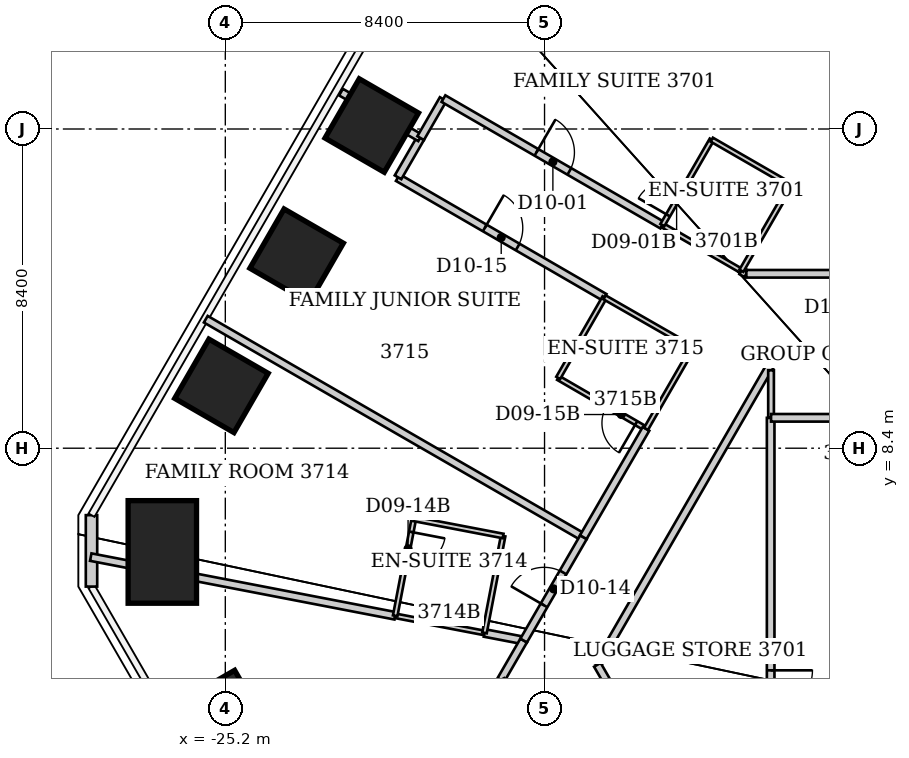
"""IFC4 building model, lengths in metres.
Left out: names, types, materials, properties, quantities, classifications, styles, units other than length and angle.
Written with IfcOpenShell. Run it as: python <this file> out.ifc"""

import sys

from ifc_helpers import new_model, si_unit, direction, frame, frame_2d, origin, origin_2d, place, context, subcontext, project, spatial, rectangle, extrude, element, fill, save


model = new_model("IFC4")
c1 = context("Model", 3, precision=1e-05, world=origin(), true_north=direction((0.0, 1.0)))
c2 = subcontext(c1, "Body", "Model", "MODEL_VIEW")
j1 = project(units=[si_unit("LENGTHUNIT", "METRE"), si_unit("PLANEANGLEUNIT", "RADIAN")], contexts=[c1])
p1 = place(None, origin())
s1 = spatial("IfcSite", under=j1, at=p1, CompositionType="ELEMENT")
p2 = place(p1, origin())
s2 = spatial("IfcBuilding", under=s1, at=p2, CompositionType="ELEMENT")
p3 = place(p2, frame((0.0, 0.0, 150.0)))
s3 = spatial("IfcBuildingStorey", under=s2, at=p3, CompositionType="ELEMENT", Elevation=150.0)
p4 = place(p3, frame((-25.284, 1.325, -0.07), z_axis=(0.05624416487, -0.002960219204, 0.998412655679), x_axis=(-0.864437776769, -0.500518005639, 0.047212880923)))
e1 = element("IfcColumn", 1, at=p4, inside=s3, PredefinedType="COLUMN", context=c2, shape_type="SweptSolid", body=[
    extrude(rectangle(XDim=1.8, YDim=1.8, at=origin_2d()), origin(), (0.0, 0.0, 1.0), 3.876),
])
p5 = place(p3, frame((-26.857, 5.67, -0.071), z_axis=(0.060174697358, -0.012714737308, 0.998106878672), x_axis=(-0.998187848607, -0.000609086615, 0.060171819876)))
e2 = element("IfcColumn", 2, at=p5, inside=s3, PredefinedType="COLUMN", context=c2, shape_type="SweptSolid", body=[
    extrude(rectangle(XDim=1.8, YDim=2.7, at=origin_2d()), origin(), (0.0, 0.0, 1.0), 3.879),
])
p6 = place(p3, frame((-25.302, 10.041, -0.061), z_axis=(0.055421674634, -0.021966677417, 0.998221369769), x_axis=(-0.864472305627, 0.499208205688, 0.058981354491)))
e3 = element("IfcColumn", 3, at=p6, inside=s3, PredefinedType="COLUMN", context=c2, shape_type="SweptSolid", body=[
    extrude(rectangle(XDim=1.8, YDim=1.8, at=origin_2d()), origin(), (0.0, 0.0, 1.0), 3.868),
])
p7 = place(p3, frame((-23.324, 13.466, -0.053), z_axis=(0.0511051556, -0.029474013007, 0.998258255978), x_axis=(-0.864748173328, 0.498728525707, 0.058995375849)))
e4 = element("IfcColumn", 4, at=p7, inside=s3, PredefinedType="COLUMN", context=c2, shape_type="SweptSolid", body=[
    extrude(rectangle(XDim=1.8, YDim=1.8, at=origin_2d()), origin(), (0.0, 0.0, 1.0), 3.86),
])
p8 = place(p3, frame((-21.346, 16.891, -0.061), z_axis=(0.046773827899, -0.036989828811, 0.998220397301), x_axis=(-0.864919891938, 0.498430416416, 0.058997461992)))
e5 = element("IfcColumn", 5, at=p8, inside=s3, PredefinedType="COLUMN", context=c2, shape_type="SweptSolid", body=[
    extrude(rectangle(XDim=1.8, YDim=1.8, at=origin_2d()), origin(), (0.0, 0.0, 1.0), 3.868),
])
p9 = place(p3, frame((-18.339, 20.424, -0.071), z_axis=(0.041102575275, -0.045760447511, 0.998106487179), x_axis=(-0.498560434841, 0.864763607509, 0.060178035354)))
e6 = element("IfcColumn", 6, at=p9, inside=s3, PredefinedType="COLUMN", context=c2, shape_type="SweptSolid", body=[
    extrude(rectangle(XDim=1.8, YDim=2.7, at=origin_2d()), origin(), (0.0, 0.0, 1.0), 3.879),
])
p10 = place(p3, frame((-28.721, 4.759, 0.0), z_axis=(0.0, 0.0, 1.0), x_axis=(0.0, 1.0, 0.0)))
e7 = element("IfcWall", 7, at=p10, inside=s3, PredefinedType="SOLIDWALL", context=c2, shape_type="SweptSolid", body=[
    extrude(rectangle(XDim=1.88, YDim=0.3, at=frame_2d((0.94, 0.0))), origin(), (0.0, 0.0, 1.0), 3.64),
])
p11 = place(p3, frame((-28.74, 5.534, 0.0), z_axis=(0.0, 0.0, 1.0), x_axis=(0.981916471091, -0.189314668743, 0.0)))
e8 = element("IfcWall", 8, at=p11, inside=s3, PredefinedType="PARTITIONING", context=c2, shape_type="SweptSolid", body=[
    extrude(rectangle(XDim=8.158, YDim=0.2, at=frame_2d((4.079, 0.0))), origin(), (0.0, 0.0, 1.0), 3.64),
])
p12 = place(p3, frame((-25.714, 11.795, 0.0), z_axis=(0.0, 0.0, 1.0), x_axis=(0.866045467449, -0.499965247104, 0.0)))
e9 = element("IfcWall", 9, at=p12, inside=s3, PredefinedType="PARTITIONING", context=c2, shape_type="SweptSolid", body=[
    extrude(rectangle(XDim=11.461, YDim=0.2, at=frame_2d((5.73, 0.0))), origin(), (0.0, 0.0, 1.0), 3.64),
])
p13 = place(p3, frame((-20.73, 3.99, 0.0), z_axis=(0.0, 0.0, 1.0), x_axis=(0.982021000234, -0.188771701001, 0.0)))
e10 = element("IfcWall", 10, at=p13, inside=s3, PredefinedType="PARTITIONING", context=c2, shape_type="SweptSolid", body=[
    extrude(rectangle(XDim=2.393, YDim=0.12, at=frame_2d((1.196, 0.0))), origin(), (0.0, 0.0, 1.0), 3.64),
])
p14 = place(p3, frame((-20.66, 15.52, 0.0), z_axis=(0.0, 0.0, 1.0), x_axis=(0.86537753305, -0.501120469839, 0.0)))
e11 = element("IfcWall", 11, at=p14, inside=s3, PredefinedType="PARTITIONING", context=c2, shape_type="SweptSolid", body=[
    extrude(rectangle(XDim=6.286, YDim=0.2, at=frame_2d((3.143, 0.0))), origin(), (0.0, 0.0, 1.0), 3.64),
])
p15 = place(p14, frame((2.643, 0.0, 0.0)))
e12 = element("IfcOpeningElement", 12, at=p15, cuts=e11, PredefinedType="OPENING", context=c2, shape_type="SweptSolid", body=[
    extrude(rectangle(XDim=1.0, YDim=2.13, at=frame_2d((0.5, 1.065))), frame((0.0, 0.1, 0.0), z_axis=(0.0, -1.0, 0.0), x_axis=(1.0, 0.0, 0.0)), (0.0, 0.0, 1.0), 0.2),
])
p16 = place(p3, frame((-20.655, 15.529, 0.0), z_axis=(0.0, 0.0, 1.0), x_axis=(0.49964553876, 0.86622995538, 0.0)))
e13 = element("IfcWall", 13, at=p16, inside=s3, PredefinedType="PARTITIONING", context=c2, shape_type="SweptSolid", body=[
    extrude(rectangle(XDim=1.191, YDim=0.2, at=frame_2d((0.595, 0.0))), origin(), (0.0, 0.0, 1.0), 3.64),
])
p17 = place(p3, frame((-20.24, 6.54, 0.0), z_axis=(0.0, 0.0, 1.0), x_axis=(-0.188697442844, -0.982035271802, 0.0)))
e14 = element("IfcWall", 14, at=p17, inside=s3, PredefinedType="PARTITIONING", context=c2, shape_type="SweptSolid", body=[
    extrude(rectangle(XDim=2.597, YDim=0.12, at=frame_2d((1.298, 0.0))), origin(), (0.0, 0.0, 1.0), 3.64),
])
p18 = place(p17, frame((0.35, 0.0, 0.0)))
e15 = element("IfcOpeningElement", 15, at=p18, cuts=e14, PredefinedType="OPENING", context=c2, shape_type="SweptSolid", body=[
    extrude(rectangle(XDim=0.9, YDim=2.03, at=frame_2d((0.45, 1.015))), frame((0.0, 0.06, 0.0), z_axis=(0.0, -1.0, 0.0), x_axis=(1.0, 0.0, 0.0)), (0.0, 0.0, 1.0), 0.12),
])
p19 = place(p3, frame((-20.073, 16.567, 0.0), z_axis=(0.0, 0.0, 1.0), x_axis=(-0.866023315909, 0.500003616288, 0.0)))
e16 = element("IfcWall", 16, at=p19, inside=s3, PredefinedType="PARTITIONING", context=c2, shape_type="SweptSolid", body=[
    extrude(rectangle(XDim=2.405, YDim=0.2, at=frame_2d((1.203, 0.0))), origin(), (0.0, 0.0, 1.0), 3.64),
])
p20 = place(p3, frame((-20.06, 16.56, 0.0), z_axis=(0.0, 0.0, 1.0), x_axis=(0.499704629046, 0.866195869137, 0.0)))
e17 = element("IfcWall", 17, at=p20, inside=s3, PredefinedType="PARTITIONING", context=c2, shape_type="SweptSolid", body=[
    extrude(rectangle(XDim=1.186, YDim=0.2, at=frame_2d((0.593, 0.0))), origin(), (0.0, 0.0, 1.0), 3.64),
])
p21 = place(p3, frame((-19.46, 17.6, 0.0), z_axis=(0.0, 0.0, 1.0), x_axis=(0.865623013862, -0.50069631302, 0.0)))
e18 = element("IfcWall", 18, at=p21, inside=s3, PredefinedType="PARTITIONING", context=c2, shape_type="SweptSolid", body=[
    extrude(rectangle(XDim=6.653, YDim=0.2, at=frame_2d((3.327, 0.0))), origin(), (0.0, 0.0, 1.0), 3.64),
])
p22 = place(p21, frame((2.827, 0.0, 0.0)))
e19 = element("IfcOpeningElement", 19, at=p22, cuts=e18, PredefinedType="OPENING", context=c2, shape_type="SweptSolid", body=[
    extrude(rectangle(XDim=1.0, YDim=2.13, at=frame_2d((0.5, 1.065))), frame((0.0, 0.1, 0.0), z_axis=(0.0, -1.0, 0.0), x_axis=(1.0, 0.0, 0.0)), (0.0, 0.0, 1.0), 0.2),
])
p23 = place(p3, frame((-18.38, 3.538, 0.0), z_axis=(0.0, 0.0, 1.0), x_axis=(0.981957872109, -0.189099808045, 0.0)))
e20 = element("IfcWall", 20, at=p23, inside=s3, PredefinedType="PARTITIONING", context=c2, shape_type="SweptSolid", body=[
    extrude(rectangle(XDim=1.004, YDim=0.2, at=frame_2d((0.502, 0.0))), origin(), (0.0, 0.0, 1.0), 3.64),
])
p24 = place(p3, frame((-18.38, 3.54, 0.0), z_axis=(0.0, 0.0, 1.0), x_axis=(0.188697442844, 0.982035271802, 0.0)))
e21 = element("IfcWall", 21, at=p24, inside=s3, PredefinedType="PARTITIONING", context=c2, shape_type="SweptSolid", body=[
    extrude(rectangle(XDim=2.597, YDim=0.12, at=frame_2d((1.298, 0.0))), origin(), (0.0, 0.0, 1.0), 3.64),
])
p25 = place(p3, frame((-17.95, 2.3, 0.0), z_axis=(0.0, 0.0, 1.0), x_axis=(0.500795801589, 0.865565459749, 0.0)))
e22 = element("IfcWall", 22, at=p25, inside=s3, PredefinedType="PARTITIONING", context=c2, shape_type="SweptSolid", body=[
    extrude(rectangle(XDim=1.201, YDim=0.2, at=frame_2d((0.6, 0.0))), origin(), (0.0, 0.0, 1.0), 3.64),
])
p26 = place(p3, frame((-17.95, 2.3, 0.0), z_axis=(0.0, 0.0, 1.0), x_axis=(0.500336423072, -0.865831082687, 0.0)))
e23 = element("IfcWall", 23, at=p26, inside=s3, PredefinedType="PARTITIONING", context=c2, shape_type="SweptSolid", body=[
    extrude(rectangle(XDim=5.117, YDim=0.2, at=frame_2d((2.558, 0.0))), origin(), (0.0, 0.0, 1.0), 3.64),
])
p27 = place(p3, frame((-17.89, 6.09, 0.0), z_axis=(0.0, 0.0, 1.0), x_axis=(-0.982160404505, 0.18804504732, 0.0)))
e24 = element("IfcWall", 24, at=p27, inside=s3, PredefinedType="PARTITIONING", context=c2, shape_type="SweptSolid", body=[
    extrude(rectangle(XDim=2.393, YDim=0.12, at=frame_2d((1.196, 0.0))), origin(), (0.0, 0.0, 1.0), 3.64),
])
p28 = place(p3, frame((-17.349, 3.339, 0.0), z_axis=(0.0, 0.0, 1.0), x_axis=(0.500803353914, 0.865561090108, 0.0)))
e25 = element("IfcWall", 25, at=p28, inside=s3, PredefinedType="PARTITIONING", context=c2, shape_type="SweptSolid", body=[
    extrude(rectangle(XDim=3.14, YDim=0.2, at=frame_2d((1.57, 0.0))), origin(), (0.0, 0.0, 1.0), 3.64),
])
p29 = place(p28, frame((1.07, 0.0, 0.0)))
e26 = element("IfcOpeningElement", 26, at=p29, cuts=e25, PredefinedType="OPENING", context=c2, shape_type="SweptSolid", body=[
    extrude(rectangle(XDim=1.0, YDim=2.13, at=frame_2d((0.5, 1.065))), frame((0.0, 0.1, 0.0), z_axis=(0.0, -1.0, 0.0), x_axis=(1.0, 0.0, 0.0)), (0.0, 0.0, 1.0), 0.2),
])
p30 = place(p3, frame((-16.44, 10.25, 0.0), z_axis=(0.0, 0.0, 1.0), x_axis=(0.864966903181, -0.501828911485, 0.0)))
e27 = element("IfcWall", 27, at=p30, inside=s3, PredefinedType="PARTITIONING", context=c2, shape_type="SweptSolid", body=[
    extrude(rectangle(XDim=2.67, YDim=0.12, at=frame_2d((1.335, 0.0))), origin(), (0.0, 0.0, 1.0), 3.64),
])
p31 = place(p30, frame((1.47, 0.0, 0.0)))
e28 = element("IfcOpeningElement", 28, at=p31, cuts=e27, PredefinedType="OPENING", context=c2, shape_type="SweptSolid", body=[
    extrude(rectangle(XDim=0.9, YDim=2.03, at=frame_2d((0.45, 1.015))), frame((0.0, 0.06, 0.0), z_axis=(0.0, -1.0, 0.0), x_axis=(1.0, 0.0, 0.0)), (0.0, 0.0, 1.0), 0.12),
])
p32 = place(p3, frame((-15.78, 6.06, 0.0), z_axis=(0.0, 0.0, 1.0), x_axis=(0.501088872721, 0.865395829453, 0.0)))
e29 = element("IfcWall", 29, at=p32, inside=s3, PredefinedType="PARTITIONING", context=c2, shape_type="SweptSolid", body=[
    extrude(rectangle(XDim=3.293, YDim=0.2, at=frame_2d((1.646, 0.0))), origin(), (0.0, 0.0, 1.0), 3.64),
])
p33 = place(p3, frame((-15.41, 2.7, 0.0), z_axis=(0.0, 0.0, 1.0), x_axis=(0.500237524763, 0.865888225361, 0.0)))
e30 = element("IfcWall", 30, at=p33, inside=s3, PredefinedType="PARTITIONING", context=c2, shape_type="SweptSolid", body=[
    extrude(rectangle(XDim=9.135, YDim=0.2, at=frame_2d((4.568, 0.0))), origin(), (0.0, 0.0, 1.0), 3.64),
])
p34 = place(p3, frame((-15.22, 12.37, 0.0), z_axis=(0.0, 0.0, 1.0), x_axis=(-0.498748634132, -0.866746675766, 0.0)))
e31 = element("IfcWall", 31, at=p34, inside=s3, PredefinedType="PARTITIONING", context=c2, shape_type="SweptSolid", body=[
    extrude(rectangle(XDim=2.446, YDim=0.12, at=frame_2d((1.223, 0.0))), origin(), (0.0, 0.0, 1.0), 3.64),
])
p35 = place(p3, frame((-15.22, 12.37, 0.0), z_axis=(0.0, 0.0, 1.0), x_axis=(0.867545659855, -0.497357545501, 0.0)))
e32 = element("IfcWall", 32, at=p35, inside=s3, PredefinedType="PARTITIONING", context=c2, shape_type="SweptSolid", body=[
    extrude(rectangle(XDim=2.674, YDim=0.12, at=frame_2d((1.337, 0.0))), origin(), (0.0, 0.0, 1.0), 3.64),
])
p36 = place(p3, frame((-14.13, 8.91, 0.0), z_axis=(0.0, 0.0, 1.0), x_axis=(0.500046071023, 0.865998803033, 0.0)))
e33 = element("IfcWall", 33, at=p36, inside=s3, PredefinedType="PARTITIONING", context=c2, shape_type="SweptSolid", body=[
    extrude(rectangle(XDim=2.46, YDim=0.12, at=frame_2d((1.23, 0.0))), origin(), (0.0, 0.0, 1.0), 3.64),
])
p37 = place(p3, frame((-13.701, 14.269, 0.0), z_axis=(0.0, 0.0, 1.0), x_axis=(0.865609526999, -0.500719628902, 0.0)))
e34 = element("IfcWall", 34, at=p37, inside=s3, PredefinedType="PARTITIONING", context=c2, shape_type="SweptSolid", body=[
    extrude(rectangle(XDim=2.401, YDim=0.12, at=frame_2d((1.201, 0.0))), origin(), (0.0, 0.0, 1.0), 3.64),
])
p38 = place(p3, frame((-12.4, 16.52, 0.0), z_axis=(0.0, 0.0, 1.0), x_axis=(-0.500291685314, -0.865856933682, 0.0)))
e35 = element("IfcWall", 35, at=p38, inside=s3, PredefinedType="PARTITIONING", context=c2, shape_type="SweptSolid", body=[
    extrude(rectangle(XDim=2.599, YDim=0.12, at=frame_2d((1.299, 0.0))), origin(), (0.0, 0.0, 1.0), 3.64),
])
p39 = place(p38, frame((1.399, 0.0, 0.0)))
e36 = element("IfcOpeningElement", 36, at=p39, cuts=e35, PredefinedType="OPENING", context=c2, shape_type="SweptSolid", body=[
    extrude(rectangle(XDim=0.9, YDim=2.03, at=frame_2d((0.45, 1.015))), frame((0.0, 0.06, 0.0), z_axis=(0.0, -1.0, 0.0), x_axis=(1.0, 0.0, 0.0)), (0.0, 0.0, 1.0), 0.12),
])
p40 = place(p3, frame((-11.622, 13.066, 0.0), z_axis=(0.0, 0.0, 1.0), x_axis=(0.865572302129, -0.500783975169, 0.0)))
e37 = element("IfcWall", 37, at=p40, inside=s3, PredefinedType="PARTITIONING", context=c2, shape_type="SweptSolid", body=[
    extrude(rectangle(XDim=0.153, YDim=0.2, at=frame_2d((0.076, 0.0))), origin(), (0.0, 0.0, 1.0), 3.64),
])
p41 = place(p3, frame((-11.62, 13.07, 0.0), z_axis=(0.0, 0.0, 1.0), x_axis=(0.500291685314, 0.865856933682, 0.0)))
e38 = element("IfcWall", 38, at=p41, inside=s3, PredefinedType="PARTITIONING", context=c2, shape_type="SweptSolid", body=[
    extrude(rectangle(XDim=2.599, YDim=0.12, at=frame_2d((1.299, 0.0))), origin(), (0.0, 0.0, 1.0), 3.64),
])
p42 = place(p3, frame((-10.948, -5.021, 0.0), z_axis=(0.0, 0.0, 1.0), x_axis=(-0.500384322182, 0.865803401538, 0.0)))
e39 = element("IfcWall", 39, at=p42, inside=s3, PredefinedType="PARTITIONING", context=c2, shape_type="SweptSolid", body=[
    extrude(rectangle(XDim=8.918, YDim=0.2, at=frame_2d((4.459, 0.0))), origin(), (0.0, 0.0, 1.0), 3.64),
])
p43 = place(p3, frame((-10.85, 9.2, 0.0), z_axis=(0.0, 0.0, 1.0), x_axis=(0.0, -1.0, 0.0)))
e40 = element("IfcWall", 40, at=p43, inside=s3, PredefinedType="PARTITIONING", context=c2, shape_type="SweptSolid", body=[
    extrude(rectangle(XDim=14.39, YDim=0.2, at=frame_2d((7.195, 0.0))), origin(), (0.0, 0.0, 1.0), 3.64),
])
p44 = place(p43, frame((6.645, 0.0, 0.0)))
e41 = element("IfcOpeningElement", 41, at=p44, cuts=e40, PredefinedType="OPENING", context=c2, shape_type="SweptSolid", body=[
    extrude(rectangle(XDim=1.1, YDim=2.2, at=frame_2d((0.55, 1.1))), frame((0.0, 0.1, 0.0), z_axis=(0.0, -1.0, 0.0), x_axis=(1.0, 0.0, 0.0)), (0.0, 0.0, 1.0), 0.2),
])
p45 = place(p3, frame((-10.84, 10.45, 0.0), z_axis=(0.0, 0.0, 1.0), x_axis=(0.0, -1.0, 0.0)))
e42 = element("IfcWall", 42, at=p45, inside=s3, PredefinedType="PARTITIONING", context=c2, shape_type="SweptSolid", body=[
    extrude(rectangle(XDim=1.25, YDim=0.15, at=frame_2d((0.625, 0.0))), origin(), (0.0, 0.0, 1.0), 3.64),
])
p46 = place(p3, frame((-10.84, 10.61, 0.0), z_axis=(0.0, 0.0, 1.0), x_axis=(0.501518373175, 0.865146994081, 0.0)))
e43 = element("IfcWall", 43, at=p46, inside=s3, PredefinedType="PARTITIONING", context=c2, shape_type="SweptSolid", body=[
    extrude(rectangle(XDim=0.439, YDim=0.2, at=frame_2d((0.22, 0.0))), origin(), (0.0, 0.0, 1.0), 3.64),
])
p47 = place(p3, frame((-10.62, 10.99, 0.0), z_axis=(0.0, 0.0, 1.0), x_axis=(1.0, 0.0, 0.0)))
e44 = element("IfcWall", 44, at=p47, inside=s3, PredefinedType="PARTITIONING", context=c2, shape_type="SweptSolid", body=[
    extrude(rectangle(XDim=4.35, YDim=0.2, at=frame_2d((2.175, 0.0))), origin(), (0.0, 0.0, 1.0), 3.64),
])
p48 = place(p3, frame((-10.32, 15.32, 0.0), z_axis=(0.0, 0.0, 1.0), x_axis=(-0.866177122335, 0.499737123639, 0.0)))
e45 = element("IfcWall", 45, at=p48, inside=s3, PredefinedType="PARTITIONING", context=c2, shape_type="SweptSolid", body=[
    extrude(rectangle(XDim=2.401, YDim=0.12, at=frame_2d((1.201, 0.0))), origin(), (0.0, 0.0, 1.0), 3.64),
])
p49 = place(p3, frame((-8.96, 12.99, 0.0), z_axis=(0.0, 0.0, 1.0), x_axis=(-1.0, 0.0, 0.0)))
e46 = element("IfcWall", 46, at=p49, inside=s3, PredefinedType="PARTITIONING", context=c2, shape_type="SweptSolid", body=[
    extrude(rectangle(XDim=2.53, YDim=0.2, at=frame_2d((1.265, 0.0))), origin(), (0.0, 0.0, 1.0), 3.64),
])
p50 = place(p3, frame((-6.27, 9.2, 0.0), z_axis=(0.0, 0.0, 1.0), x_axis=(-1.0, 0.0, 0.0)))
e47 = element("IfcWall", 47, at=p50, inside=s3, PredefinedType="PARTITIONING", context=c2, shape_type="SweptSolid", body=[
    extrude(rectangle(XDim=4.57, YDim=0.2, at=frame_2d((2.285, 0.0))), origin(), (0.0, 0.0, 1.0), 3.64),
])
p51 = place(p50, frame((1.735, 0.0, 0.0)))
e48 = element("IfcOpeningElement", 48, at=p51, cuts=e47, PredefinedType="OPENING", context=c2, shape_type="SweptSolid", body=[
    extrude(rectangle(XDim=1.1, YDim=2.2, at=frame_2d((0.55, 1.1))), frame((0.0, 0.1, 0.0), z_axis=(0.0, -1.0, 0.0), x_axis=(1.0, 0.0, 0.0)), (0.0, 0.0, 1.0), 0.2),
])
p52 = place(p22, origin())
e49 = element("IfcDoor", 49, at=p52, inside=s3, OperationType="SINGLE_SWING_LEFT", PredefinedType="DOOR", context=c2, shape_type="SweptSolid", body=[
    extrude(rectangle(XDim=1.0, YDim=2.13, at=frame_2d((0.5, 1.065))), frame((0.0, 0.025, 0.0), z_axis=(0.0, -1.0, 0.0), x_axis=(1.0, 0.0, 0.0)), (0.0, 0.0, 1.0), 0.05),
])
fill(e19, e49)
p53 = place(p39, origin())
e50 = element("IfcDoor", 50, at=p53, inside=s3, OperationType="SINGLE_SWING_RIGHT", PredefinedType="DOOR", context=c2, shape_type="SweptSolid", body=[
    extrude(rectangle(XDim=0.9, YDim=2.03, at=frame_2d((0.45, 1.015))), frame((0.0, 0.025, 0.0), z_axis=(0.0, -1.0, 0.0), x_axis=(1.0, 0.0, 0.0)), (0.0, 0.0, 1.0), 0.05),
])
fill(e36, e50)
p54 = place(p29, origin())
e51 = element("IfcDoor", 51, at=p54, inside=s3, OperationType="SINGLE_SWING_LEFT", PredefinedType="DOOR", context=c2, shape_type="SweptSolid", body=[
    extrude(rectangle(XDim=1.0, YDim=2.13, at=frame_2d((0.5, 1.065))), frame((0.0, 0.025, 0.0), z_axis=(0.0, -1.0, 0.0), x_axis=(1.0, 0.0, 0.0)), (0.0, 0.0, 1.0), 0.05),
])
fill(e26, e51)
p55 = place(p18, origin())
e52 = element("IfcDoor", 52, at=p55, inside=s3, OperationType="SINGLE_SWING_LEFT", PredefinedType="DOOR", context=c2, shape_type="SweptSolid", body=[
    extrude(rectangle(XDim=0.9, YDim=2.03, at=frame_2d((0.45, 1.015))), frame((0.0, 0.025, 0.0), z_axis=(0.0, -1.0, 0.0), x_axis=(1.0, 0.0, 0.0)), (0.0, 0.0, 1.0), 0.05),
])
fill(e15, e52)
p56 = place(p15, origin())
e53 = element("IfcDoor", 53, at=p56, inside=s3, OperationType="SINGLE_SWING_LEFT", PredefinedType="DOOR", context=c2, shape_type="SweptSolid", body=[
    extrude(rectangle(XDim=1.0, YDim=2.13, at=frame_2d((0.5, 1.065))), frame((0.0, 0.025, 0.0), z_axis=(0.0, -1.0, 0.0), x_axis=(1.0, 0.0, 0.0)), (0.0, 0.0, 1.0), 0.05),
])
fill(e12, e53)
p57 = place(p31, origin())
e54 = element("IfcDoor", 54, at=p57, inside=s3, OperationType="SINGLE_SWING_RIGHT", PredefinedType="DOOR", context=c2, shape_type="SweptSolid", body=[
    extrude(rectangle(XDim=0.9, YDim=2.03, at=frame_2d((0.45, 1.015))), frame((0.0, 0.025, 0.0), z_axis=(0.0, -1.0, 0.0), x_axis=(1.0, 0.0, 0.0)), (0.0, 0.0, 1.0), 0.05),
])
fill(e28, e54)
p58 = place(p44, origin())
e55 = element("IfcDoor", 55, at=p58, inside=s3, OperationType="SINGLE_SWING_LEFT", PredefinedType="DOOR", context=c2, shape_type="SweptSolid", body=[
    extrude(rectangle(XDim=1.1, YDim=2.2, at=frame_2d((0.55, 1.1))), frame((0.0, 0.025, 0.0), z_axis=(0.0, -1.0, 0.0), x_axis=(1.0, 0.0, 0.0)), (0.0, 0.0, 1.0), 0.05),
])
fill(e41, e55)
save(model, sys.argv[1])
